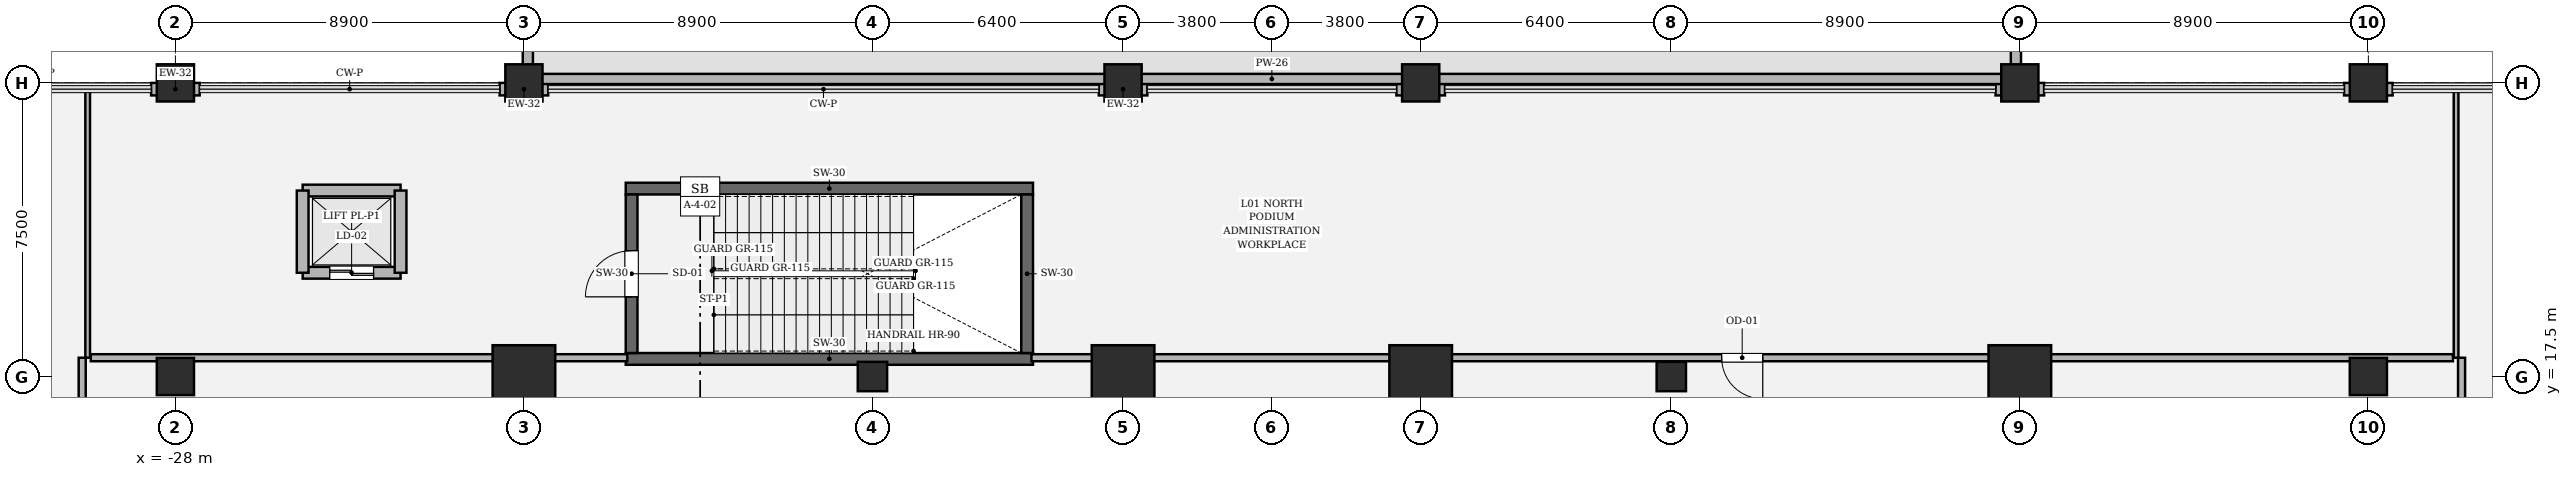
"""IFC4 building model, lengths in metres.
Left out: names, types, materials, properties, quantities, classifications, styles, units other than length and angle.
Written with IfcOpenShell. Run it as: python <this file> out.ifc"""

import sys

from ifc_helpers import new_model, si_unit, direction, frame, frame_2d, origin, origin_2d, place, context, subcontext, project, spatial, rectangle, hollow_rectangle, circle, extrude, element, fill, save


model = new_model("IFC4")
c1 = context("Model", 3, precision=1e-05, world=origin(), true_north=direction((0.0, 1.0)))
c2 = subcontext(c1, "Body", "Model", "MODEL_VIEW")
j1 = project(units=[si_unit("LENGTHUNIT", "METRE"), si_unit("PLANEANGLEUNIT", "RADIAN")], contexts=[c1])
p1 = place(None, origin())
s1 = spatial("IfcSite", under=j1, at=p1, CompositionType="ELEMENT")
p2 = place(p1, origin())
s2 = spatial("IfcBuilding", under=s1, at=p2, CompositionType="ELEMENT")
p3 = place(p2, frame((0.0, 0.0, 6.0)))
s3 = spatial("IfcBuildingStorey", under=s2, at=p3, CompositionType="ELEMENT", Elevation=6.0)
for number, where, z_axis, x_axis in (
    (1, (-16.5, 17.95, 0.0), (0.0, 0.0, 1.0), (1.0, 0.0, 0.0)),
    (2, (-6.1, 22.3, 0.0), (0.0, 0.0, 1.0), (-1.0, 0.0, 0.0)),
):
    element("IfcWall", number, at=place(p3, frame(where, z_axis=z_axis, x_axis=x_axis)), inside=s3, PredefinedType="SOLIDWALL", context=c2, shape_type="SweptSolid", body=[
        extrude(rectangle(XDim=10.4, YDim=0.3, at=frame_2d((5.2, 0.0))), origin(), (0.0, 0.0, 1.0), 5.4),
    ])
p4 = place(p3, frame((-16.35, 18.1, 0.0), z_axis=(0.0, 0.0, 1.0), x_axis=(0.0, 1.0, 0.0)))
e3 = element("IfcWall", 3, at=p4, inside=s3, PredefinedType="SOLIDWALL", context=c2, shape_type="SweptSolid", body=[
    extrude(rectangle(XDim=4.05, YDim=0.3, at=frame_2d((2.025, 0.0))), origin(), (0.0, 0.0, 1.0), 5.4),
])
p5 = place(p4, frame((1.435, 0.0, 0.0)))
e4 = element("IfcOpeningElement", 4, at=p5, cuts=e3, PredefinedType="OPENING", context=c2, shape_type="SweptSolid", body=[
    extrude(rectangle(XDim=1.18, YDim=2.2, at=frame_2d((0.59, 1.1))), frame((0.0, 0.16, 0.0), z_axis=(0.0, -1.0, 0.0), x_axis=(1.0, 0.0, 0.0)), (0.0, 0.0, 1.0), 0.32),
])
p6 = place(p3, frame((-6.25, 22.15, 0.0), z_axis=(0.0, 0.0, 1.0), x_axis=(0.0, -1.0, 0.0)))
e5 = element("IfcWall", 5, at=p6, inside=s3, PredefinedType="SOLIDWALL", context=c2, shape_type="SweptSolid", body=[
    extrude(rectangle(XDim=4.05, YDim=0.3, at=frame_2d((2.025, 0.0))), origin(), (0.0, 0.0, 1.0), 5.4),
])
for number, where, z_axis, x_axis in (
    (6, (19.1, 17.5, 0.0), (0.0, 0.0, 1.0), (1.0, 0.0, 0.0)),
    (7, (3.8, 17.5, 0.0), (0.0, 0.0, 1.0), (1.0, 0.0, 0.0)),
    (8, (-3.8, 17.5, 0.0), (0.0, 0.0, 1.0), (1.0, 0.0, 0.0)),
    (9, (-19.1, 17.5, 0.0), (0.0, 0.0, 1.0), (1.0, 0.0, 0.0)),
):
    element("IfcColumn", number, at=place(p3, frame(where, z_axis=z_axis, x_axis=x_axis)), inside=s3, PredefinedType="COLUMN", context=c2, shape_type="SweptSolid", body=[
        extrude(hollow_rectangle(XDim=1.6, YDim=1.6, WallThickness=0.05, at=origin_2d()), origin(), (0.0, 0.0, 1.0), 5.4),
    ])
for number, where, z_axis, x_axis in (
    (10, (-28.0, 17.5, 0.0), (0.0, 0.0, 1.0), (1.0, 0.0, 0.0)),
    (11, (28.0, 17.5, 0.0), (0.0, 0.0, 1.0), (1.0, 0.0, 0.0)),
    (12, (-28.0, 25.0, 0.0), (0.0, 0.0, 1.0), (1.0, 0.0, 0.0)),
    (13, (-19.1, 25.0, 0.0), (0.0, 0.0, 1.0), (1.0, 0.0, 0.0)),
    (14, (-3.8, 25.0, 0.0), (0.0, 0.0, 1.0), (1.0, 0.0, 0.0)),
    (15, (3.8, 25.0, 0.0), (0.0, 0.0, 1.0), (1.0, 0.0, 0.0)),
    (16, (19.1, 25.0, 0.0), (0.0, 0.0, 1.0), (1.0, 0.0, 0.0)),
    (17, (28.0, 25.0, 0.0), (0.0, 0.0, 1.0), (1.0, 0.0, 0.0)),
):
    element("IfcColumn", number, at=place(p3, frame(where, z_axis=z_axis, x_axis=x_axis)), inside=s3, PredefinedType="COLUMN", context=c2, shape_type="SweptSolid", body=[
        extrude(rectangle(XDim=0.95, YDim=0.95, at=origin_2d()), origin(), (0.0, 0.0, 1.0), 5.4),
    ])
for number, where, z_axis, x_axis in (
    (18, (-10.2, 17.5, 0.0), (0.0, 0.0, 1.0), (1.0, 0.0, 0.0)),
    (19, (10.2, 17.5, 0.0), (0.0, 0.0, 1.0), (1.0, 0.0, 0.0)),
):
    element("IfcColumn", number, at=place(p3, frame(where, z_axis=z_axis, x_axis=x_axis)), inside=s3, PredefinedType="PILASTER", context=c2, shape_type="SweptSolid", body=[
        extrude(circle(Radius=0.375, at=origin_2d()), origin(), (0.0, 0.0, 1.0), 5.4),
    ])
p7 = place(p3, frame((-27.38, 24.84, 0.0), z_axis=(0.0, 0.0, 1.0), x_axis=(-1.0, 0.0, 0.0)))
e20 = element("IfcWall", 20, at=p7, inside=s3, PredefinedType="SOLIDWALL", context=c2, shape_type="SweptSolid", body=[
    extrude(rectangle(XDim=1.24, YDim=0.32, at=frame_2d((0.62, 0.0))), origin(), (0.0, 0.0, 1.0), 4.414),
])
for number, where, z_axis, x_axis in (
    (21, (-18.48, 24.84, 0.0), (0.0, 0.0, 1.0), (-1.0, 0.0, 0.0)),
    (22, (-3.18, 24.84, 0.0), (0.0, 0.0, 1.0), (-1.0, 0.0, 0.0)),
    (23, (4.42, 24.84, 0.0), (0.0, 0.0, 1.0), (-1.0, 0.0, 0.0)),
    (24, (19.72, 24.84, 0.0), (0.0, 0.0, 1.0), (-1.0, 0.0, 0.0)),
):
    element("IfcWall", number, at=place(p3, frame(where, z_axis=z_axis, x_axis=x_axis)), inside=s3, PredefinedType="SOLIDWALL", context=c2, shape_type="SweptSolid", body=[
        extrude(rectangle(XDim=1.24, YDim=0.32, at=frame_2d((0.62, 0.0))), origin(), (0.0, 0.0, 1.0), 4.414),
    ])
p8 = place(p3, frame((28.62, 24.84, 0.0), z_axis=(0.0, 0.0, 1.0), x_axis=(-1.0, 0.0, 0.0)))
e25 = element("IfcWall", 25, at=p8, inside=s3, PredefinedType="SOLIDWALL", context=c2, shape_type="SweptSolid", body=[
    extrude(rectangle(XDim=1.24, YDim=0.32, at=frame_2d((0.62, 0.0))), origin(), (0.0, 0.0, 1.0), 4.414),
])
p9 = place(p3, frame((-19.0, 25.1, 0.0), z_axis=(0.0, 0.0, 1.0), x_axis=(1.0, 0.0, 0.0)))
e26 = element("IfcWall", 26, at=p9, inside=s3, PredefinedType="PARAPET", context=c2, shape_type="SweptSolid", body=[
    extrude(rectangle(XDim=38.0, YDim=0.26, at=frame_2d((19.0, 0.0))), origin(), (0.0, 0.0, 1.0), 1.15),
])
for number, where, z_axis, x_axis in (
    (27, (19.0, 25.1, 0.0), (0.0, 0.0, 1.0), (0.0, 1.0, 0.0)),
    (28, (-19.0, 27.62, 0.0), (0.0, 0.0, 1.0), (0.0, -1.0, 0.0)),
):
    element("IfcWall", number, at=place(p3, frame(where, z_axis=z_axis, x_axis=x_axis)), inside=s3, PredefinedType="PARAPET", context=c2, shape_type="SweptSolid", body=[
        extrude(rectangle(XDim=2.52, YDim=0.26, at=frame_2d((1.26, 0.0))), origin(), (0.0, 0.0, 1.0), 1.15),
    ])
p10 = place(p3, frame((-24.75, 20.15, 0.0), z_axis=(0.0, 0.0, 1.0), x_axis=(1.0, 0.0, 0.0)))
e29 = element("IfcWall", 29, at=p10, inside=s3, PredefinedType="SOLIDWALL", context=c2, shape_type="SweptSolid", body=[
    extrude(rectangle(XDim=2.5, YDim=0.3, at=frame_2d((1.25, 0.0))), origin(), (0.0, 0.0, 1.0), 5.12),
])
p11 = place(p10, frame((0.69, 0.0, 0.0)))
e30 = element("IfcOpeningElement", 30, at=p11, cuts=e29, PredefinedType="OPENING", context=c2, shape_type="SweptSolid", body=[
    extrude(rectangle(XDim=1.12, YDim=2.25, at=frame_2d((0.56, 1.125))), frame((0.0, 0.16, 0.0), z_axis=(0.0, -1.0, 0.0), x_axis=(1.0, 0.0, 0.0)), (0.0, 0.0, 1.0), 0.32),
])
p12 = place(p3, frame((-24.75, 22.25, 0.0), z_axis=(0.0, 0.0, 1.0), x_axis=(1.0, 0.0, 0.0)))
e31 = element("IfcWall", 31, at=p12, inside=s3, PredefinedType="SOLIDWALL", context=c2, shape_type="SweptSolid", body=[
    extrude(rectangle(XDim=2.5, YDim=0.3, at=frame_2d((1.25, 0.0))), origin(), (0.0, 0.0, 1.0), 5.12),
])
for number, where, z_axis, x_axis in (
    (32, (-24.75, 20.15, 0.0), (0.0, 0.0, 1.0), (0.0, 1.0, 0.0)),
    (33, (-22.25, 20.15, 0.0), (0.0, 0.0, 1.0), (0.0, 1.0, 0.0)),
):
    element("IfcWall", number, at=place(p3, frame(where, z_axis=z_axis, x_axis=x_axis)), inside=s3, PredefinedType="SOLIDWALL", context=c2, shape_type="SweptSolid", body=[
        extrude(rectangle(XDim=2.1, YDim=0.3, at=frame_2d((1.05, 0.0))), origin(), (0.0, 0.0, 1.0), 5.12),
    ])
p13 = place(p3, frame((-30.24, 24.78, 0.0), z_axis=(0.0, 0.0, 1.0), x_axis=(0.0, -1.0, 0.0)))
e34 = element("IfcWall", 34, at=p13, inside=s3, PredefinedType="PARTITIONING", context=c2, shape_type="SweptSolid", body=[
    extrude(rectangle(XDim=6.8, YDim=0.12, at=frame_2d((3.4, 0.0))), origin(), (0.0, 0.0, 1.0), 5.12),
])
p14 = place(p3, frame((-30.38, 17.98, 0.0), z_axis=(0.0, 0.0, 1.0), x_axis=(0.0, -1.0, 0.0)))
e35 = element("IfcWall", 35, at=p14, inside=s3, PredefinedType="PARTITIONING", context=c2, shape_type="SweptSolid", body=[
    extrude(rectangle(XDim=30.94, YDim=0.18, at=frame_2d((15.47, 0.0))), origin(), (0.0, 0.0, 1.0), 4.414),
])
p15 = place(p14, frame((14.945, 0.0, 0.0)))
e36 = element("IfcOpeningElement", 36, at=p15, cuts=e35, PredefinedType="OPENING", context=c2, shape_type="SweptSolid", body=[
    extrude(rectangle(XDim=1.05, YDim=2.2, at=frame_2d((0.525, 1.1))), frame((0.0, 0.1, 0.0), z_axis=(0.0, -1.0, 0.0), x_axis=(1.0, 0.0, 0.0)), (0.0, 0.0, 1.0), 0.2),
])
p16 = place(p3, frame((30.38, 1.26, 0.0), z_axis=(0.0, 0.0, 1.0), x_axis=(0.0, 1.0, 0.0)))
e37 = element("IfcWall", 37, at=p16, inside=s3, PredefinedType="PARTITIONING", context=c2, shape_type="SweptSolid", body=[
    extrude(rectangle(XDim=16.72, YDim=0.18, at=frame_2d((8.36, 0.0))), origin(), (0.0, 0.0, 1.0), 4.414),
])
p17 = place(p3, frame((30.24, 17.98, 0.0), z_axis=(0.0, 0.0, 1.0), x_axis=(0.0, 1.0, 0.0)))
e38 = element("IfcWall", 38, at=p17, inside=s3, PredefinedType="PARTITIONING", context=c2, shape_type="SweptSolid", body=[
    extrude(rectangle(XDim=6.8, YDim=0.12, at=frame_2d((3.4, 0.0))), origin(), (0.0, 0.0, 1.0), 5.12),
])
p18 = place(p3, frame((30.16, 17.98, 0.0), z_axis=(0.0, 0.0, 1.0), x_axis=(-1.0, 0.0, 0.0)))
e39 = element("IfcWall", 39, at=p18, inside=s3, PredefinedType="PARTITIONING", context=c2, shape_type="SweptSolid", body=[
    extrude(rectangle(XDim=36.3, YDim=0.18, at=frame_2d((18.15, 0.0))), origin(), (0.0, 0.0, 1.0), 4.414),
])
p19 = place(p18, frame((17.625, 0.0, 0.0)))
e40 = element("IfcOpeningElement", 40, at=p19, cuts=e39, PredefinedType="OPENING", context=c2, shape_type="SweptSolid", body=[
    extrude(rectangle(XDim=1.05, YDim=2.2, at=frame_2d((0.525, 1.1))), frame((0.0, 0.1, 0.0), z_axis=(0.0, -1.0, 0.0), x_axis=(1.0, 0.0, 0.0)), (0.0, 0.0, 1.0), 0.2),
])
p20 = place(p3, frame((-16.46, 17.98, 0.0), z_axis=(0.0, 0.0, 1.0), x_axis=(-1.0, 0.0, 0.0)))
e41 = element("IfcWall", 41, at=p20, inside=s3, PredefinedType="PARTITIONING", context=c2, shape_type="SweptSolid", body=[
    extrude(rectangle(XDim=13.7, YDim=0.18, at=frame_2d((6.85, 0.0))), origin(), (0.0, 0.0, 1.0), 4.414),
])
p21 = place(p5, origin())
e42 = element("IfcDoor", 42, at=p21, inside=s3, OperationType="SINGLE_SWING_LEFT", PredefinedType="DOOR", context=c2, shape_type="SweptSolid", body=[
    extrude(rectangle(XDim=1.18, YDim=2.2, at=frame_2d((0.59, 1.1))), frame((0.0, 0.025, 0.0), z_axis=(0.0, -1.0, 0.0), x_axis=(1.0, 0.0, 0.0)), (0.0, 0.0, 1.0), 0.05),
])
fill(e4, e42)
p22 = place(p11, origin())
e43 = element("IfcDoor", 43, at=p22, inside=s3, OperationType="DOUBLE_DOOR_SLIDING", PredefinedType="DOOR", context=c2, shape_type="SweptSolid", body=[
    extrude(rectangle(XDim=1.12, YDim=2.25, at=frame_2d((0.56, 1.125))), frame((0.0, 0.025, 0.0), z_axis=(0.0, -1.0, 0.0), x_axis=(1.0, 0.0, 0.0)), (0.0, 0.0, 1.0), 0.05),
])
fill(e30, e43)
p23 = place(p19, origin())
e44 = element("IfcDoor", 44, at=p23, inside=s3, OperationType="SINGLE_SWING_LEFT", PredefinedType="DOOR", context=c2, shape_type="SweptSolid", body=[
    extrude(rectangle(XDim=1.05, YDim=2.2, at=frame_2d((0.525, 1.1))), frame((0.0, 0.025, 0.0), z_axis=(0.0, -1.0, 0.0), x_axis=(1.0, 0.0, 0.0)), (0.0, 0.0, 1.0), 0.05),
])
fill(e40, e44)
save(model, sys.argv[1])
